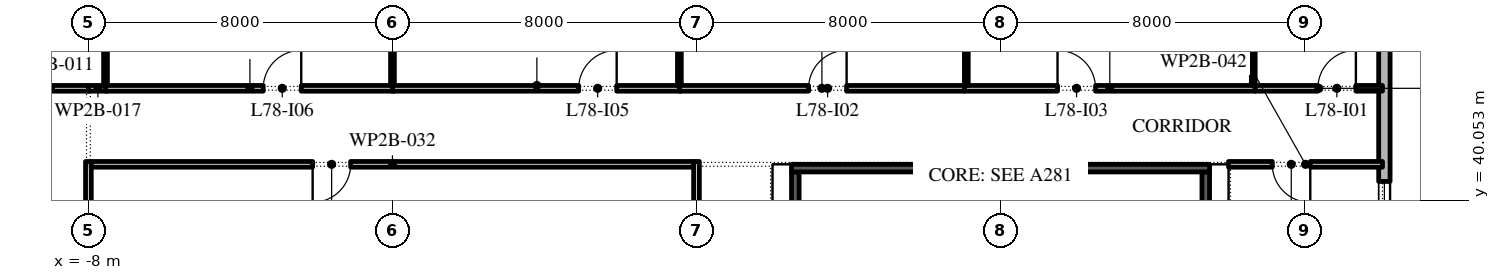
"""IFC4 building model, lengths in metres.
Left out: names, types, materials, properties, quantities, classifications, styles, units other than length and angle.
Written with IfcOpenShell. Run it as: python <this file> out.ifc"""

import sys

from ifc_helpers import new_model, si_unit, direction, frame, frame_2d, origin, place, context, subcontext, project, spatial, rectangle, extrude, element, fill, save


model = new_model("IFC4")
c1 = context("Model", 3, precision=1e-05, world=origin(), true_north=direction((0.0, 1.0)))
c2 = subcontext(c1, "Body", "Model", "MODEL_VIEW")
j1 = project(units=[si_unit("LENGTHUNIT", "METRE"), si_unit("PLANEANGLEUNIT", "RADIAN")], contexts=[c1])
p1 = place(None, origin())
s1 = spatial("IfcSite", under=j1, at=p1, CompositionType="ELEMENT")
p2 = place(p1, origin())
s2 = spatial("IfcBuilding", under=s1, at=p2, CompositionType="ELEMENT")
p3 = place(p2, frame((0.0, 0.0, 355.2)))
s3 = spatial("IfcBuildingStorey", under=s2, at=p3, CompositionType="ELEMENT", Elevation=355.2)
p4 = place(p3, frame((26.1, -2.1, 0.0), z_axis=(0.0, 0.0, 1.0), x_axis=(0.0, 1.0, 0.0)))
e1 = element("IfcWall", 1, at=p4, inside=s3, PredefinedType="STANDARD", context=c2, shape_type="SweptSolid", body=[
    extrude(rectangle(XDim=51.5, YDim=0.3, at=frame_2d((25.75, 0.0))), origin(), (0.0, 0.0, 1.0), 3.95),
])
p5 = place(p4, frame((1.3, 0.0, 0.45)))
e2 = element("IfcOpeningElement", 2, at=p5, cuts=e1, PredefinedType="OPENING", context=c2, shape_type="SweptSolid", body=[
    extrude(rectangle(XDim=4.5, YDim=3.0, at=frame_2d((2.25, 1.5))), frame((0.0, 0.16, 0.0), z_axis=(0.0, -1.0, 0.0), x_axis=(1.0, 0.0, 0.0)), (0.0, 0.0, 1.0), 0.32),
])
p6 = place(p4, frame((8.55, 0.0, 0.45)))
e3 = element("IfcOpeningElement", 3, at=p6, cuts=e1, PredefinedType="OPENING", context=c2, shape_type="SweptSolid", body=[
    extrude(rectangle(XDim=4.5, YDim=3.0, at=frame_2d((2.25, 1.5))), frame((0.0, 0.16, 0.0), z_axis=(0.0, -1.0, 0.0), x_axis=(1.0, 0.0, 0.0)), (0.0, 0.0, 1.0), 0.32),
])
p7 = place(p4, frame((17.0, 0.0, 0.0)))
e4 = element("IfcOpeningElement", 4, at=p7, cuts=e1, PredefinedType="OPENING", context=c2, shape_type="SweptSolid", body=[
    extrude(rectangle(XDim=2.4, YDim=3.5, at=frame_2d((1.2, 1.75))), frame((0.0, 0.16, 0.0), z_axis=(0.0, -1.0, 0.0), x_axis=(1.0, 0.0, 0.0)), (0.0, 0.0, 1.0), 0.32),
])
p8 = place(p4, frame((23.35, 0.0, 0.45)))
e5 = element("IfcOpeningElement", 5, at=p8, cuts=e1, PredefinedType="OPENING", context=c2, shape_type="SweptSolid", body=[
    extrude(rectangle(XDim=4.5, YDim=3.05, at=frame_2d((2.25, 1.525))), frame((0.0, 0.16, 0.0), z_axis=(0.0, -1.0, 0.0), x_axis=(1.0, 0.0, 0.0)), (0.0, 0.0, 1.0), 0.32),
])
p9 = place(p4, frame((30.75, 0.0, 0.45)))
e6 = element("IfcOpeningElement", 6, at=p9, cuts=e1, PredefinedType="OPENING", context=c2, shape_type="SweptSolid", body=[
    extrude(rectangle(XDim=4.5, YDim=3.0, at=frame_2d((2.25, 1.5))), frame((0.0, 0.16, 0.0), z_axis=(0.0, -1.0, 0.0), x_axis=(1.0, 0.0, 0.0)), (0.0, 0.0, 1.0), 0.32),
])
p10 = place(p4, frame((38.15, 0.0, 0.45)))
e7 = element("IfcOpeningElement", 7, at=p10, cuts=e1, PredefinedType="OPENING", context=c2, shape_type="SweptSolid", body=[
    extrude(rectangle(XDim=4.5, YDim=3.05, at=frame_2d((2.25, 1.525))), frame((0.0, 0.16, 0.0), z_axis=(0.0, -1.0, 0.0), x_axis=(1.0, 0.0, 0.0)), (0.0, 0.0, 1.0), 0.32),
])
p11 = place(p4, frame((46.6, 0.0, 0.0)))
e8 = element("IfcOpeningElement", 8, at=p11, cuts=e1, PredefinedType="OPENING", context=c2, shape_type="SweptSolid", body=[
    extrude(rectangle(XDim=2.4, YDim=3.5, at=frame_2d((1.2, 1.75))), frame((0.0, 0.16, 0.0), z_axis=(0.0, -1.0, 0.0), x_axis=(1.0, 0.0, 0.0)), (0.0, 0.0, 1.0), 0.32),
])
p12 = place(p3, frame((21.4, 25.75, 0.0), z_axis=(0.0, 0.0, 1.0), x_axis=(0.0, 1.0, 0.0)))
e9 = element("IfcWall", 9, at=p12, inside=s3, PredefinedType="SHEAR", context=c2, shape_type="SweptSolid", body=[
    extrude(rectangle(XDim=15.05, YDim=0.2, at=frame_2d((7.525, 0.0))), origin(), (0.0, 0.0, 1.0), 3.95),
])
p13 = place(p3, frame((10.6, 25.75, 0.0), z_axis=(0.0, 0.0, 1.0), x_axis=(0.0, 1.0, 0.0)))
e10 = element("IfcWall", 10, at=p13, inside=s3, PredefinedType="SHEAR", context=c2, shape_type="SweptSolid", body=[
    extrude(rectangle(XDim=15.05, YDim=0.2, at=frame_2d((7.525, 0.0))), origin(), (0.0, 0.0, 1.0), 3.95),
])
p14 = place(p13, frame((3.288, 0.0, 0.0)))
e11 = element("IfcOpeningElement", 11, at=p14, cuts=e10, PredefinedType="OPENING", context=c2, shape_type="SweptSolid", body=[
    extrude(rectangle(XDim=0.9, YDim=2.1, at=frame_2d((0.45, 1.05))), frame((0.0, 0.11, 0.0), z_axis=(0.0, -1.0, 0.0), x_axis=(1.0, 0.0, 0.0)), (0.0, 0.0, 1.0), 0.22),
])
p15 = place(p13, frame((10.887, 0.0, 0.0)))
e12 = element("IfcOpeningElement", 12, at=p15, cuts=e10, PredefinedType="OPENING", context=c2, shape_type="SweptSolid", body=[
    extrude(rectangle(XDim=0.9, YDim=2.1, at=frame_2d((0.45, 1.05))), frame((0.0, 0.11, 0.0), z_axis=(0.0, -1.0, 0.0), x_axis=(1.0, 0.0, 0.0)), (0.0, 0.0, 1.0), 0.22),
])
p16 = place(p3, frame((10.5, 40.9, 0.0), z_axis=(0.0, 0.0, 1.0), x_axis=(1.0, 0.0, 0.0)))
e13 = element("IfcWall", 13, at=p16, inside=s3, PredefinedType="SHEAR", context=c2, shape_type="SweptSolid", body=[
    extrude(rectangle(XDim=11.0, YDim=0.2, at=frame_2d((5.5, 0.0))), origin(), (0.0, 0.0, 1.0), 3.95),
])
p17 = place(p3, frame((-10.0, 43.0, 0.0), z_axis=(0.0, 0.0, 1.0), x_axis=(1.0, 0.0, 0.0)))
e14 = element("IfcWall", 14, at=p17, inside=s3, PredefinedType="PARTITIONING", context=c2, shape_type="SweptSolid", body=[
    extrude(rectangle(XDim=2.0, YDim=0.15, at=frame_2d((1.0, 0.0))), origin(), (0.0, 0.0, 1.0), 3.95),
])
p18 = place(p3, frame((-8.0, 41.075, 0.0), z_axis=(0.0, 0.0, 1.0), x_axis=(0.0, -1.0, 0.0)))
e15 = element("IfcWall", 15, at=p18, inside=s3, PredefinedType="PARTITIONING", context=c2, shape_type="SweptSolid", body=[
    extrude(rectangle(XDim=6.475, YDim=0.15, at=frame_2d((3.237, 0.0))), origin(), (0.0, 0.0, 1.0), 3.95),
])
p19 = place(p3, frame((-8.0, 43.0, 0.0), z_axis=(0.0, 0.0, 1.0), x_axis=(1.0, 0.0, 0.0)))
e16 = element("IfcWall", 16, at=p19, inside=s3, PredefinedType="PARTITIONING", context=c2, shape_type="SweptSolid", body=[
    extrude(rectangle(XDim=0.5, YDim=0.15, at=frame_2d((0.25, 0.0))), origin(), (0.0, 0.0, 1.0), 3.95),
])
p20 = place(p3, frame((-7.55, 43.075, 0.0), z_axis=(0.0, 0.0, 1.0), x_axis=(0.0, 1.0, 0.0)))
e17 = element("IfcWall", 17, at=p20, inside=s3, PredefinedType="PARTITIONING", context=c2, shape_type="SweptSolid", body=[
    extrude(rectangle(XDim=3.875, YDim=0.1, at=frame_2d((1.938, 0.0))), origin(), (0.0, 0.0, 1.0), 3.031),
])
p21 = place(p3, frame((-7.55, 43.0, 0.0), z_axis=(0.0, 0.0, 1.0), x_axis=(1.0, 0.0, 0.0)))
e18 = element("IfcWall", 18, at=p21, inside=s3, PredefinedType="PARTITIONING", context=c2, shape_type="SweptSolid", body=[
    extrude(rectangle(XDim=7.6, YDim=0.15, at=frame_2d((3.8, 0.0))), origin(), (0.0, 0.0, 1.0), 3.95),
])
p22 = place(p21, frame((4.15, 0.0, 0.0)))
e19 = element("IfcOpeningElement", 19, at=p22, cuts=e18, PredefinedType="OPENING", context=c2, shape_type="SweptSolid", body=[
    extrude(rectangle(XDim=1.0, YDim=2.1, at=frame_2d((0.5, 1.05))), frame((0.0, 0.085, 0.0), z_axis=(0.0, -1.0, 0.0), x_axis=(1.0, 0.0, 0.0)), (0.0, 0.0, 1.0), 0.17),
])
p23 = place(p3, frame((0.0, 43.075, 0.0), z_axis=(0.0, 0.0, 1.0), x_axis=(0.0, 1.0, 0.0)))
e20 = element("IfcWall", 20, at=p23, inside=s3, PredefinedType="PARTITIONING", context=c2, shape_type="SweptSolid", body=[
    extrude(rectangle(XDim=9.725, YDim=0.1, at=frame_2d((4.863, 0.0))), origin(), (0.0, 0.0, 1.0), 3.95),
])
p24 = place(p3, frame((0.0, 43.0, 0.0), z_axis=(0.0, 0.0, 1.0), x_axis=(1.0, 0.0, 0.0)))
e21 = element("IfcWall", 21, at=p24, inside=s3, PredefinedType="PARTITIONING", context=c2, shape_type="SweptSolid", body=[
    extrude(rectangle(XDim=7.6, YDim=0.15, at=frame_2d((3.8, 0.0))), origin(), (0.0, 0.0, 1.0), 3.95),
])
p25 = place(p24, frame((4.9, 0.0, 0.0)))
e22 = element("IfcOpeningElement", 22, at=p25, cuts=e21, PredefinedType="OPENING", context=c2, shape_type="SweptSolid", body=[
    extrude(rectangle(XDim=1.0, YDim=2.1, at=frame_2d((0.5, 1.05))), frame((0.0, 0.085, 0.0), z_axis=(0.0, -1.0, 0.0), x_axis=(1.0, 0.0, 0.0)), (0.0, 0.0, 1.0), 0.17),
])
p26 = place(p3, frame((7.55, 43.075, 0.0), z_axis=(0.0, 0.0, 1.0), x_axis=(0.0, 1.0, 0.0)))
e23 = element("IfcWall", 23, at=p26, inside=s3, PredefinedType="PARTITIONING", context=c2, shape_type="SweptSolid", body=[
    extrude(rectangle(XDim=9.725, YDim=0.1, at=frame_2d((4.863, 0.0))), origin(), (0.0, 0.0, 1.0), 3.031),
])
p27 = place(p3, frame((7.55, 43.0, 0.0), z_axis=(0.0, 0.0, 1.0), x_axis=(1.0, 0.0, 0.0)))
e24 = element("IfcWall", 24, at=p27, inside=s3, PredefinedType="PARTITIONING", context=c2, shape_type="SweptSolid", body=[
    extrude(rectangle(XDim=7.5, YDim=0.15, at=frame_2d((3.75, 0.0))), origin(), (0.0, 0.0, 1.0), 3.95),
])
p28 = place(p27, frame((3.4, 0.0, 0.0)))
e25 = element("IfcOpeningElement", 25, at=p28, cuts=e24, PredefinedType="OPENING", context=c2, shape_type="SweptSolid", body=[
    extrude(rectangle(XDim=1.0, YDim=2.1, at=frame_2d((0.5, 1.05))), frame((0.0, 0.085, 0.0), z_axis=(0.0, -1.0, 0.0), x_axis=(1.0, 0.0, 0.0)), (0.0, 0.0, 1.0), 0.17),
])
p29 = place(p3, frame((8.0, 34.65, 0.0), z_axis=(0.0, 0.0, 1.0), x_axis=(0.0, 1.0, 0.0)))
e26 = element("IfcWall", 26, at=p29, inside=s3, PredefinedType="PARTITIONING", context=c2, shape_type="SweptSolid", body=[
    extrude(rectangle(XDim=6.425, YDim=0.15, at=frame_2d((3.212, 0.0))), origin(), (0.0, 0.0, 1.0), 3.95),
])
p30 = place(p3, frame((7.925, 41.0, 0.0), z_axis=(0.0, 0.0, 1.0), x_axis=(-1.0, 0.0, 0.0)))
e27 = element("IfcWall", 27, at=p30, inside=s3, PredefinedType="PARTITIONING", context=c2, shape_type="SweptSolid", body=[
    extrude(rectangle(XDim=15.85, YDim=0.15, at=frame_2d((7.925, 0.0))), origin(), (0.0, 0.0, 1.0), 3.95),
])
p31 = place(p30, frame((9.025, 0.0, 0.0)))
e28 = element("IfcOpeningElement", 28, at=p31, cuts=e27, PredefinedType="OPENING", context=c2, shape_type="SweptSolid", body=[
    extrude(rectangle(XDim=1.0, YDim=2.1, at=frame_2d((0.5, 1.05))), frame((0.0, 0.085, 0.0), z_axis=(0.0, -1.0, 0.0), x_axis=(1.0, 0.0, 0.0)), (0.0, 0.0, 1.0), 0.17),
])
p32 = place(p3, frame((15.05, 43.0, 0.0), z_axis=(0.0, 0.0, 1.0), x_axis=(1.0, 0.0, 0.0)))
e29 = element("IfcWall", 29, at=p32, inside=s3, PredefinedType="PARTITIONING", context=c2, shape_type="SweptSolid", body=[
    extrude(rectangle(XDim=7.65, YDim=0.15, at=frame_2d((3.825, 0.0))), origin(), (0.0, 0.0, 1.0), 3.95),
])
p33 = place(p32, frame((2.45, 0.0, 0.0)))
e30 = element("IfcOpeningElement", 30, at=p33, cuts=e29, PredefinedType="OPENING", context=c2, shape_type="SweptSolid", body=[
    extrude(rectangle(XDim=1.0, YDim=2.1, at=frame_2d((0.5, 1.05))), frame((0.0, 0.085, 0.0), z_axis=(0.0, -1.0, 0.0), x_axis=(1.0, 0.0, 0.0)), (0.0, 0.0, 1.0), 0.17),
])
p34 = place(p3, frame((15.1, 47.05, 0.0), z_axis=(0.0, 0.0, 1.0), x_axis=(0.0, -1.0, 0.0)))
e31 = element("IfcWall", 31, at=p34, inside=s3, PredefinedType="PARTITIONING", context=c2, shape_type="SweptSolid", body=[
    extrude(rectangle(XDim=3.975, YDim=0.1, at=frame_2d((1.988, 0.0))), origin(), (0.0, 0.0, 1.0), 3.95),
])
p35 = place(p3, frame((22.65, 43.075, 0.0), z_axis=(0.0, 0.0, 1.0), x_axis=(0.0, 1.0, 0.0)))
e32 = element("IfcWall", 32, at=p35, inside=s3, PredefinedType="PARTITIONING", context=c2, shape_type="SweptSolid", body=[
    extrude(rectangle(XDim=3.875, YDim=0.1, at=frame_2d((1.938, 0.0))), origin(), (0.0, 0.0, 1.0), 3.95),
])
p36 = place(p3, frame((22.7, 43.0, 0.0), z_axis=(0.0, 0.0, 1.0), x_axis=(1.0, 0.0, 0.0)))
e33 = element("IfcWall", 33, at=p36, inside=s3, PredefinedType="PARTITIONING", context=c2, shape_type="SweptSolid", body=[
    extrude(rectangle(XDim=3.35, YDim=0.15, at=frame_2d((1.675, 0.0))), origin(), (0.0, 0.0, 1.0), 3.95),
])
p37 = place(p36, frame((1.65, 0.0, 0.0)))
e34 = element("IfcOpeningElement", 34, at=p37, cuts=e33, PredefinedType="OPENING", context=c2, shape_type="SweptSolid", body=[
    extrude(rectangle(XDim=1.0, YDim=2.1, at=frame_2d((0.5, 1.05))), frame((0.0, 0.085, 0.0), z_axis=(0.0, -1.0, 0.0), x_axis=(1.0, 0.0, 0.0)), (0.0, 0.0, 1.0), 0.17),
])
p38 = place(p3, frame((26.05, 41.0, 0.0), z_axis=(0.0, 0.0, 1.0), x_axis=(-1.0, 0.0, 0.0)))
e35 = element("IfcWall", 35, at=p38, inside=s3, PredefinedType="PARTITIONING", context=c2, shape_type="SweptSolid", body=[
    extrude(rectangle(XDim=4.05, YDim=0.15, at=frame_2d((2.025, 0.0))), origin(), (0.0, 0.0, 1.0), 3.95),
])
p39 = place(p38, frame((1.9, 0.0, 0.0)))
e36 = element("IfcOpeningElement", 36, at=p39, cuts=e35, PredefinedType="OPENING", context=c2, shape_type="SweptSolid", body=[
    extrude(rectangle(XDim=1.0, YDim=2.1, at=frame_2d((0.5, 1.05))), frame((0.0, 0.085, 0.0), z_axis=(0.0, -1.0, 0.0), x_axis=(1.0, 0.0, 0.0)), (0.0, 0.0, 1.0), 0.17),
])
p40 = place(p10, origin())
e37 = element("IfcWindow", 37, at=p40, inside=s3, PartitioningType="DOUBLE_PANEL_VERTICAL", PredefinedType="WINDOW", context=c2, shape_type="SweptSolid", body=[
    extrude(rectangle(XDim=4.5, YDim=3.05, at=frame_2d((2.25, 1.525))), frame((0.0, 0.03, 0.0), z_axis=(0.0, -1.0, 0.0), x_axis=(1.0, 0.0, 0.0)), (0.0, 0.0, 1.0), 0.06),
])
fill(e7, e37)
p41 = place(p37, origin())
e38 = element("IfcDoor", 38, at=p41, inside=s3, OperationType="SINGLE_SWING_LEFT", PredefinedType="DOOR", context=c2, shape_type="SweptSolid", body=[
    extrude(rectangle(XDim=1.0, YDim=2.1, at=frame_2d((0.5, 1.05))), frame((0.0, 0.025, 0.0), z_axis=(0.0, -1.0, 0.0), x_axis=(1.0, 0.0, 0.0)), (0.0, 0.0, 1.0), 0.05),
])
fill(e34, e38)
p42 = place(p28, origin())
e39 = element("IfcDoor", 39, at=p42, inside=s3, OperationType="SINGLE_SWING_LEFT", PredefinedType="DOOR", context=c2, shape_type="SweptSolid", body=[
    extrude(rectangle(XDim=1.0, YDim=2.1, at=frame_2d((0.5, 1.05))), frame((0.0, 0.025, 0.0), z_axis=(0.0, -1.0, 0.0), x_axis=(1.0, 0.0, 0.0)), (0.0, 0.0, 1.0), 0.05),
])
fill(e25, e39)
p43 = place(p33, origin())
e40 = element("IfcDoor", 40, at=p43, inside=s3, OperationType="SINGLE_SWING_RIGHT", PredefinedType="DOOR", context=c2, shape_type="SweptSolid", body=[
    extrude(rectangle(XDim=1.0, YDim=2.1, at=frame_2d((0.5, 1.05))), frame((0.0, 0.025, 0.0), z_axis=(0.0, -1.0, 0.0), x_axis=(1.0, 0.0, 0.0)), (0.0, 0.0, 1.0), 0.05),
])
fill(e30, e40)
p44 = place(p25, origin())
e41 = element("IfcDoor", 41, at=p44, inside=s3, OperationType="SINGLE_SWING_LEFT", PredefinedType="DOOR", context=c2, shape_type="SweptSolid", body=[
    extrude(rectangle(XDim=1.0, YDim=2.1, at=frame_2d((0.5, 1.05))), frame((0.0, 0.025, 0.0), z_axis=(0.0, -1.0, 0.0), x_axis=(1.0, 0.0, 0.0)), (0.0, 0.0, 1.0), 0.05),
])
fill(e22, e41)
p45 = place(p22, origin())
e42 = element("IfcDoor", 42, at=p45, inside=s3, OperationType="SINGLE_SWING_LEFT", PredefinedType="DOOR", context=c2, shape_type="SweptSolid", body=[
    extrude(rectangle(XDim=1.0, YDim=2.1, at=frame_2d((0.5, 1.05))), frame((0.0, 0.025, 0.0), z_axis=(0.0, -1.0, 0.0), x_axis=(1.0, 0.0, 0.0)), (0.0, 0.0, 1.0), 0.05),
])
fill(e19, e42)
p46 = place(p31, origin())
e43 = element("IfcDoor", 43, at=p46, inside=s3, OperationType="SINGLE_SWING_LEFT", PredefinedType="DOOR", context=c2, shape_type="SweptSolid", body=[
    extrude(rectangle(XDim=1.0, YDim=2.1, at=frame_2d((0.5, 1.05))), frame((0.0, 0.025, 0.0), z_axis=(0.0, -1.0, 0.0), x_axis=(1.0, 0.0, 0.0)), (0.0, 0.0, 1.0), 0.05),
])
fill(e28, e43)
p47 = place(p39, origin())
e44 = element("IfcDoor", 44, at=p47, inside=s3, OperationType="SINGLE_SWING_RIGHT", PredefinedType="DOOR", context=c2, shape_type="SweptSolid", body=[
    extrude(rectangle(XDim=1.0, YDim=2.1, at=frame_2d((0.5, 1.05))), frame((0.0, 0.025, 0.0), z_axis=(0.0, -1.0, 0.0), x_axis=(1.0, 0.0, 0.0)), (0.0, 0.0, 1.0), 0.05),
])
fill(e36, e44)
save(model, sys.argv[1])
